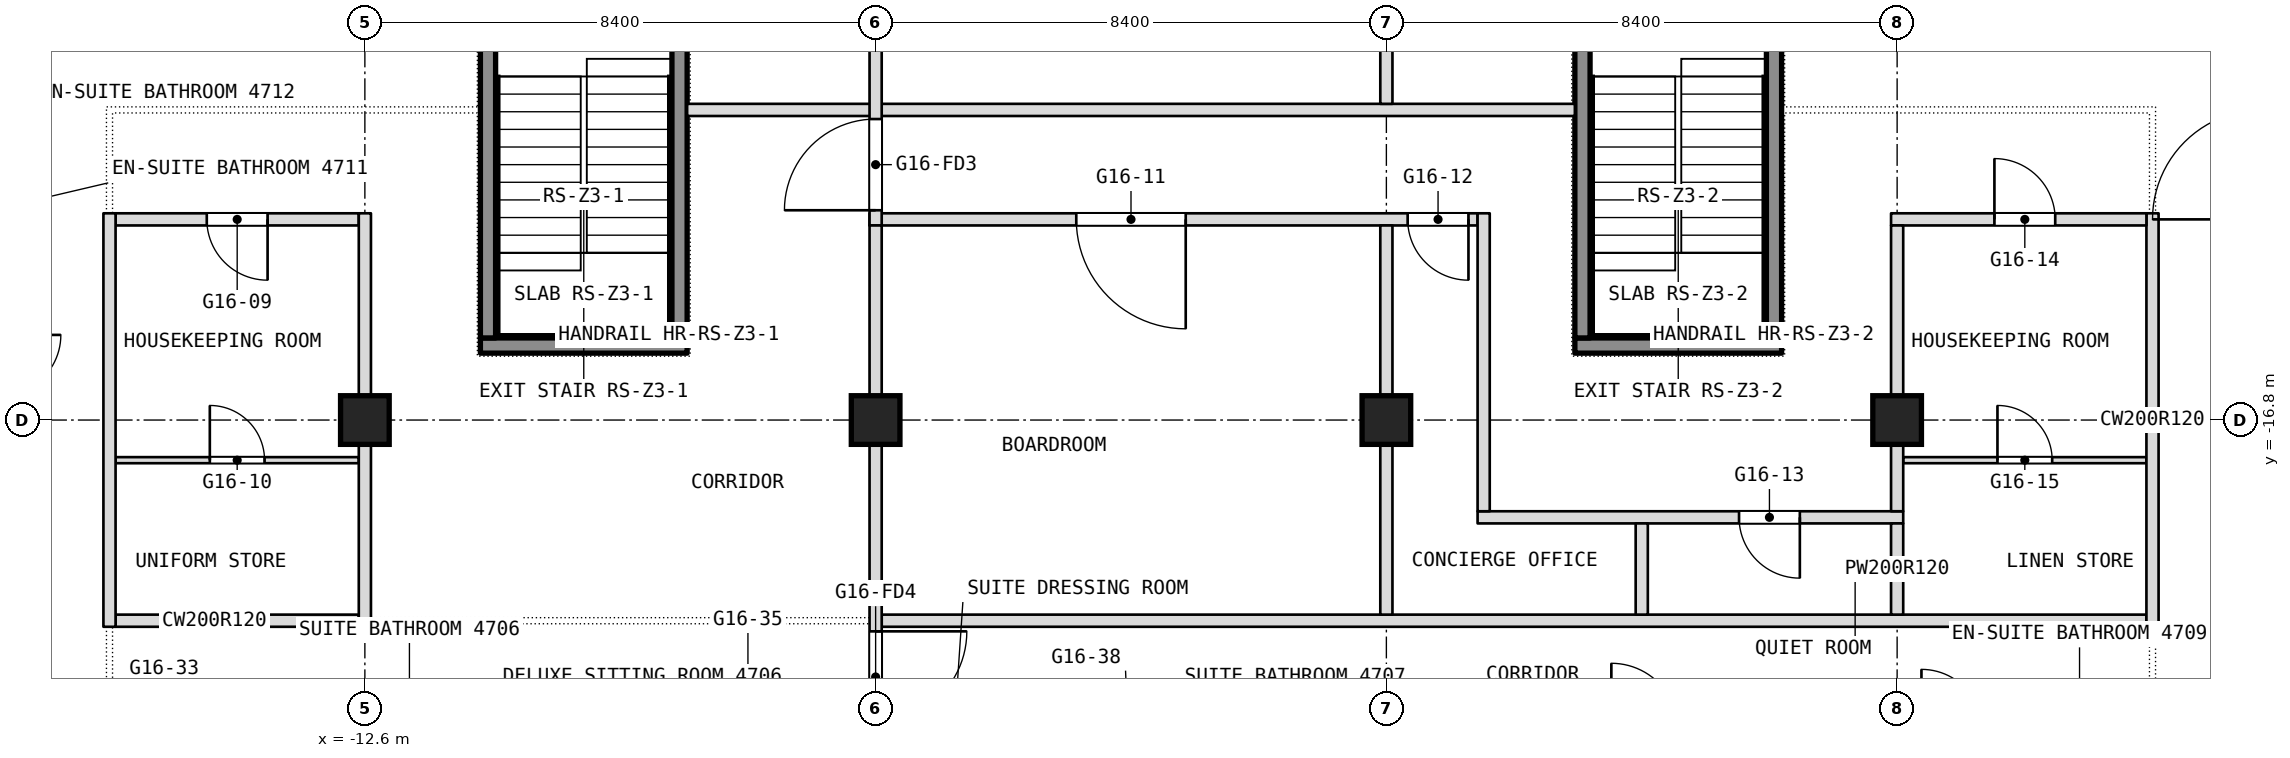
"""IFC4 building model, lengths in metres.
Left out: names, types, materials, properties, quantities, classifications, styles, units other than length and angle.
Written with IfcOpenShell. Run it as: python <this file> out.ifc"""

import sys

from ifc_helpers import new_model, si_unit, direction, frame, frame_2d, origin, origin_2d, place, context, subcontext, project, spatial, rectangle, extrude, element, fill, save


model = new_model("IFC4")
c1 = context("Model", 3, precision=1e-05, world=origin(), true_north=direction((0.0, 1.0)))
c2 = subcontext(c1, "Body", "Model", "MODEL_VIEW")
j1 = project(units=[si_unit("LENGTHUNIT", "METRE"), si_unit("PLANEANGLEUNIT", "RADIAN")], contexts=[c1])
p1 = place(None, origin())
s1 = spatial("IfcSite", under=j1, at=p1, CompositionType="ELEMENT")
p2 = place(p1, origin())
s2 = spatial("IfcBuilding", under=s1, at=p2, CompositionType="ELEMENT")
p3 = place(p2, frame((0.0, 0.0, 205.7)))
s3 = spatial("IfcBuildingStorey", under=s2, at=p3, CompositionType="ELEMENT", Elevation=205.7)
for number, where, z_axis, x_axis in (
    (1, (-12.6, -16.8, 0.0), (0.0, 0.0, 1.0), (1.0, 0.0, 0.0)),
    (2, (-4.2, -16.8, 0.0), (0.0, 0.0, 1.0), (1.0, 0.0, 0.0)),
    (3, (4.2, -16.8, 0.0), (0.0, 0.0, 1.0), (1.0, 0.0, 0.0)),
    (4, (12.6, -16.8, 0.0), (0.0, 0.0, 1.0), (1.0, 0.0, 0.0)),
):
    element("IfcColumn", number, at=place(p3, frame(where, z_axis=z_axis, x_axis=x_axis)), inside=s3, PredefinedType="COLUMN", context=c2, shape_type="SweptSolid", body=[
        extrude(rectangle(XDim=0.8, YDim=0.8, at=origin_2d()), origin(), (0.0, 0.0, 1.0), 3.6),
    ])
p4 = place(p3, frame((-16.7, -20.1, 0.0), z_axis=(0.0, 0.0, 1.0), x_axis=(1.0, 0.0, 0.0)))
e5 = element("IfcWall", 5, at=p4, inside=s3, PredefinedType="PARTITIONING", context=c2, shape_type="SweptSolid", body=[
    extrude(rectangle(XDim=4.0, YDim=0.2, at=frame_2d((2.0, 0.0))), origin(), (0.0, 0.0, 1.0), 3.34),
])
p5 = place(p3, frame((-4.1, -20.1, 0.0), z_axis=(0.0, 0.0, 1.0), x_axis=(1.0, 0.0, 0.0)))
e6 = element("IfcWall", 6, at=p5, inside=s3, PredefinedType="PARTITIONING", context=c2, shape_type="SweptSolid", body=[
    extrude(rectangle(XDim=20.8, YDim=0.2, at=frame_2d((10.4, 0.0))), origin(), (0.0, 0.0, 1.0), 3.34),
])
p6 = place(p3, frame((5.7, -18.4, 0.0), z_axis=(0.0, 0.0, 1.0), x_axis=(1.0, 0.0, 0.0)))
e7 = element("IfcWall", 7, at=p6, inside=s3, PredefinedType="PARTITIONING", context=c2, shape_type="SweptSolid", body=[
    extrude(rectangle(XDim=7.0, YDim=0.2, at=frame_2d((3.5, 0.0))), origin(), (0.0, 0.0, 1.0), 3.34),
])
p7 = place(p6, frame((4.3, 0.0, 0.0)))
e8 = element("IfcOpeningElement", 8, at=p7, cuts=e7, PredefinedType="OPENING", context=c2, shape_type="SweptSolid", body=[
    extrude(rectangle(XDim=1.0, YDim=2.1, at=frame_2d((0.5, 1.05))), frame((0.0, 0.1, 0.0), z_axis=(0.0, -1.0, 0.0), x_axis=(1.0, 0.0, 0.0)), (0.0, 0.0, 1.0), 0.2),
])
p8 = place(p3, frame((-16.7, -17.46, 0.0), z_axis=(0.0, 0.0, 1.0), x_axis=(1.0, 0.0, 0.0)))
e9 = element("IfcWall", 9, at=p8, inside=s3, PredefinedType="PARTITIONING", context=c2, shape_type="SweptSolid", body=[
    extrude(rectangle(XDim=4.0, YDim=0.1, at=frame_2d((2.0, 0.0))), origin(), (0.0, 0.0, 1.0), 3.34),
])
p9 = place(p8, frame((1.55, 0.0, 0.0)))
e10 = element("IfcOpeningElement", 10, at=p9, cuts=e9, PredefinedType="OPENING", context=c2, shape_type="SweptSolid", body=[
    extrude(rectangle(XDim=0.9, YDim=2.1, at=frame_2d((0.45, 1.05))), frame((0.0, 0.05, 0.0), z_axis=(0.0, -1.0, 0.0), x_axis=(1.0, 0.0, 0.0)), (0.0, 0.0, 1.0), 0.1),
])
p10 = place(p3, frame((12.7, -17.46, 0.0), z_axis=(0.0, 0.0, 1.0), x_axis=(1.0, 0.0, 0.0)))
e11 = element("IfcWall", 11, at=p10, inside=s3, PredefinedType="PARTITIONING", context=c2, shape_type="SweptSolid", body=[
    extrude(rectangle(XDim=4.0, YDim=0.1, at=frame_2d((2.0, 0.0))), origin(), (0.0, 0.0, 1.0), 3.34),
])
p11 = place(p10, frame((1.55, 0.0, 0.0)))
e12 = element("IfcOpeningElement", 12, at=p11, cuts=e11, PredefinedType="OPENING", context=c2, shape_type="SweptSolid", body=[
    extrude(rectangle(XDim=0.9, YDim=2.1, at=frame_2d((0.45, 1.05))), frame((0.0, 0.05, 0.0), z_axis=(0.0, -1.0, 0.0), x_axis=(1.0, 0.0, 0.0)), (0.0, 0.0, 1.0), 0.1),
])
p12 = place(p3, frame((16.8, -20.2, 0.0), z_axis=(0.0, 0.0, 1.0), x_axis=(0.0, 1.0, 0.0)))
e13 = element("IfcWall", 13, at=p12, inside=s3, PredefinedType="PARTITIONING", context=c2, shape_type="SweptSolid", body=[
    extrude(rectangle(XDim=6.8, YDim=0.2, at=frame_2d((3.4, 0.0))), origin(), (0.0, 0.0, 1.0), 3.34),
])
p13 = place(p3, frame((-16.7, -13.5, 0.0), z_axis=(0.0, 0.0, 1.0), x_axis=(1.0, 0.0, 0.0)))
e14 = element("IfcWall", 14, at=p13, inside=s3, PredefinedType="PARTITIONING", context=c2, shape_type="SweptSolid", body=[
    extrude(rectangle(XDim=4.0, YDim=0.2, at=frame_2d((2.0, 0.0))), origin(), (0.0, 0.0, 1.0), 3.34),
])
p14 = place(p13, frame((1.5, 0.0, 0.0)))
e15 = element("IfcOpeningElement", 15, at=p14, cuts=e14, PredefinedType="OPENING", context=c2, shape_type="SweptSolid", body=[
    extrude(rectangle(XDim=1.0, YDim=2.1, at=frame_2d((0.5, 1.05))), frame((0.0, 0.1, 0.0), z_axis=(0.0, -1.0, 0.0), x_axis=(1.0, 0.0, 0.0)), (0.0, 0.0, 1.0), 0.2),
])
p15 = place(p3, frame((-4.3, -13.5, 0.0), z_axis=(0.0, 0.0, 1.0), x_axis=(1.0, 0.0, 0.0)))
e16 = element("IfcWall", 16, at=p15, inside=s3, PredefinedType="PARTITIONING", context=c2, shape_type="SweptSolid", body=[
    extrude(rectangle(XDim=10.0, YDim=0.2, at=frame_2d((5.0, 0.0))), origin(), (0.0, 0.0, 1.0), 3.34),
])
p16 = place(p15, frame((3.4, 0.0, 0.0)))
e17 = element("IfcOpeningElement", 17, at=p16, cuts=e16, PredefinedType="OPENING", context=c2, shape_type="SweptSolid", body=[
    extrude(rectangle(XDim=1.8, YDim=2.1, at=frame_2d((0.9, 1.05))), frame((0.0, 0.1, 0.0), z_axis=(0.0, -1.0, 0.0), x_axis=(1.0, 0.0, 0.0)), (0.0, 0.0, 1.0), 0.2),
])
p17 = place(p15, frame((8.85, 0.0, 0.0)))
e18 = element("IfcOpeningElement", 18, at=p17, cuts=e16, PredefinedType="OPENING", context=c2, shape_type="SweptSolid", body=[
    extrude(rectangle(XDim=1.0, YDim=2.1, at=frame_2d((0.5, 1.05))), frame((0.0, 0.1, 0.0), z_axis=(0.0, -1.0, 0.0), x_axis=(1.0, 0.0, 0.0)), (0.0, 0.0, 1.0), 0.2),
])
p18 = place(p3, frame((12.5, -13.5, 0.0), z_axis=(0.0, 0.0, 1.0), x_axis=(1.0, 0.0, 0.0)))
e19 = element("IfcWall", 19, at=p18, inside=s3, PredefinedType="PARTITIONING", context=c2, shape_type="SweptSolid", body=[
    extrude(rectangle(XDim=4.2, YDim=0.2, at=frame_2d((2.1, 0.0))), origin(), (0.0, 0.0, 1.0), 3.34),
])
p19 = place(p18, frame((1.7, 0.0, 0.0)))
e20 = element("IfcOpeningElement", 20, at=p19, cuts=e19, PredefinedType="OPENING", context=c2, shape_type="SweptSolid", body=[
    extrude(rectangle(XDim=1.0, YDim=2.1, at=frame_2d((0.5, 1.05))), frame((0.0, 0.1, 0.0), z_axis=(0.0, -1.0, 0.0), x_axis=(1.0, 0.0, 0.0)), (0.0, 0.0, 1.0), 0.2),
])
p20 = place(p3, frame((12.6, -20.0, 0.0), z_axis=(0.0, 0.0, 1.0), x_axis=(0.0, 1.0, 0.0)))
e21 = element("IfcWall", 21, at=p20, inside=s3, PredefinedType="PARTITIONING", context=c2, shape_type="SweptSolid", body=[
    extrude(rectangle(XDim=1.5, YDim=0.2, at=frame_2d((0.75, 0.0))), origin(), (0.0, 0.0, 1.0), 3.34),
])
p21 = place(p3, frame((12.6, -18.3, 0.0), z_axis=(0.0, 0.0, 1.0), x_axis=(0.0, 1.0, 0.0)))
e22 = element("IfcWall", 22, at=p21, inside=s3, PredefinedType="PARTITIONING", context=c2, shape_type="SweptSolid", body=[
    extrude(rectangle(XDim=4.7, YDim=0.2, at=frame_2d((2.35, 0.0))), origin(), (0.0, 0.0, 1.0), 3.34),
])
p22 = place(p3, frame((-7.3, -11.7, 0.0), z_axis=(0.0, 0.0, 1.0), x_axis=(1.0, 0.0, 0.0)))
e23 = element("IfcWall", 23, at=p22, inside=s3, PredefinedType="PARTITIONING", context=c2, shape_type="SweptSolid", body=[
    extrude(rectangle(XDim=14.6, YDim=0.2, at=frame_2d((7.3, 0.0))), origin(), (0.0, 0.0, 1.0), 3.34),
])
p23 = place(p3, frame((8.4, -20.0, 0.0), z_axis=(0.0, 0.0, 1.0), x_axis=(0.0, 1.0, 0.0)))
e24 = element("IfcWall", 24, at=p23, inside=s3, PredefinedType="PARTITIONING", context=c2, shape_type="SweptSolid", body=[
    extrude(rectangle(XDim=1.5, YDim=0.2, at=frame_2d((0.75, 0.0))), origin(), (0.0, 0.0, 1.0), 3.34),
])
p24 = place(p3, frame((5.8, -18.3, 0.0), z_axis=(0.0, 0.0, 1.0), x_axis=(0.0, 1.0, 0.0)))
e25 = element("IfcWall", 25, at=p24, inside=s3, PredefinedType="PARTITIONING", context=c2, shape_type="SweptSolid", body=[
    extrude(rectangle(XDim=4.9, YDim=0.2, at=frame_2d((2.45, 0.0))), origin(), (0.0, 0.0, 1.0), 3.34),
])
p25 = place(p3, frame((4.2, -20.0, 0.0), z_axis=(0.0, 0.0, 1.0), x_axis=(0.0, 1.0, 0.0)))
e26 = element("IfcWall", 26, at=p25, inside=s3, PredefinedType="PARTITIONING", context=c2, shape_type="SweptSolid", body=[
    extrude(rectangle(XDim=6.4, YDim=0.2, at=frame_2d((3.2, 0.0))), origin(), (0.0, 0.0, 1.0), 3.34),
])
p26 = place(p3, frame((4.2, -11.6, 0.0), z_axis=(0.0, 0.0, 1.0), x_axis=(0.0, 1.0, 0.0)))
e27 = element("IfcWall", 27, at=p26, inside=s3, PredefinedType="PARTITIONING", context=c2, shape_type="SweptSolid", body=[
    extrude(rectangle(XDim=9.7, YDim=0.2, at=frame_2d((4.85, 0.0))), origin(), (0.0, 0.0, 1.0), 3.34),
])
p27 = place(p3, frame((-4.2, -13.6, 0.0), z_axis=(0.0, 0.0, 1.0), x_axis=(0.0, 1.0, 0.0)))
e28 = element("IfcWall", 28, at=p27, inside=s3, PredefinedType="PARTITIONING", context=c2, shape_type="SweptSolid", body=[
    extrude(rectangle(XDim=13.6, YDim=0.2, at=frame_2d((6.8, 0.0))), origin(), (0.0, 0.0, 1.0), 3.34),
])
p28 = place(p27, frame((11.95, 0.0, 0.0)))
e29 = element("IfcOpeningElement", 29, at=p28, cuts=e28, PredefinedType="OPENING", context=c2, shape_type="SweptSolid", body=[
    extrude(rectangle(XDim=1.5, YDim=2.1, at=frame_2d((0.75, 1.05))), frame((0.0, 0.1, 0.0), z_axis=(0.0, -1.0, 0.0), x_axis=(1.0, 0.0, 0.0)), (0.0, 0.0, 1.0), 0.2),
])
p29 = place(p27, frame((0.25, 0.0, 0.0)))
e30 = element("IfcOpeningElement", 30, at=p29, cuts=e28, PredefinedType="OPENING", context=c2, shape_type="SweptSolid", body=[
    extrude(rectangle(XDim=1.5, YDim=2.1, at=frame_2d((0.75, 1.05))), frame((0.0, 0.1, 0.0), z_axis=(0.0, -1.0, 0.0), x_axis=(1.0, 0.0, 0.0)), (0.0, 0.0, 1.0), 0.2),
])
p30 = place(p3, frame((-4.2, -22.0, 0.0), z_axis=(0.0, 0.0, 1.0), x_axis=(0.0, 1.0, 0.0)))
e31 = element("IfcWall", 31, at=p30, inside=s3, PredefinedType="PARTITIONING", context=c2, shape_type="SweptSolid", body=[
    extrude(rectangle(XDim=8.4, YDim=0.2, at=frame_2d((4.2, 0.0))), origin(), (0.0, 0.0, 1.0), 3.34),
])
p31 = place(p30, frame((0.225, 0.0, 0.0)))
e32 = element("IfcOpeningElement", 32, at=p31, cuts=e31, PredefinedType="OPENING", context=c2, shape_type="SweptSolid", body=[
    extrude(rectangle(XDim=1.5, YDim=2.1, at=frame_2d((0.75, 1.05))), frame((0.0, 0.1, 0.0), z_axis=(0.0, -1.0, 0.0), x_axis=(1.0, 0.0, 0.0)), (0.0, 0.0, 1.0), 0.2),
])
for number, where, z_axis, x_axis in (
    (33, (-12.6, -20.2, 0.0), (0.0, 0.0, 1.0), (0.0, 1.0, 0.0)),
    (34, (-16.8, -20.2, 0.0), (0.0, 0.0, 1.0), (0.0, 1.0, 0.0)),
):
    element("IfcWall", number, at=place(p3, frame(where, z_axis=z_axis, x_axis=x_axis)), inside=s3, PredefinedType="PARTITIONING", context=c2, shape_type="SweptSolid", body=[
        extrude(rectangle(XDim=6.8, YDim=0.2, at=frame_2d((3.4, 0.0))), origin(), (0.0, 0.0, 1.0), 3.34),
    ])
p32 = place(p3, frame((-10.7, -15.575, 0.1), z_axis=(0.0, 0.0, 1.0), x_axis=(1.0, 0.0, 0.0)))
e35 = element("IfcWall", 35, at=p32, inside=s3, PredefinedType="SHEAR", context=c2, shape_type="SweptSolid", body=[
    extrude(rectangle(XDim=3.4, YDim=0.25, at=frame_2d((1.7, 0.0))), origin(), (0.0, 0.0, 1.0), 3.6),
])
for number, where, z_axis, x_axis in (
    (36, (-10.575, -15.45, 0.1), (0.0, 0.0, 1.0), (0.0, 1.0, 0.0)),
    (37, (-7.425, -15.45, 0.1), (0.0, 0.0, 1.0), (0.0, 1.0, 0.0)),
):
    element("IfcWall", number, at=place(p3, frame(where, z_axis=z_axis, x_axis=x_axis)), inside=s3, PredefinedType="SHEAR", context=c2, shape_type="SweptSolid", body=[
        extrude(rectangle(XDim=5.7, YDim=0.25, at=frame_2d((2.85, 0.0))), origin(), (0.0, 0.0, 1.0), 3.6),
    ])
p33 = place(p3, frame((7.3, -15.575, 0.1), z_axis=(0.0, 0.0, 1.0), x_axis=(1.0, 0.0, 0.0)))
e38 = element("IfcWall", 38, at=p33, inside=s3, PredefinedType="SHEAR", context=c2, shape_type="SweptSolid", body=[
    extrude(rectangle(XDim=3.4, YDim=0.25, at=frame_2d((1.7, 0.0))), origin(), (0.0, 0.0, 1.0), 3.6),
])
for number, where, z_axis, x_axis in (
    (39, (7.425, -15.45, 0.1), (0.0, 0.0, 1.0), (0.0, 1.0, 0.0)),
    (40, (10.575, -15.45, 0.1), (0.0, 0.0, 1.0), (0.0, 1.0, 0.0)),
):
    element("IfcWall", number, at=place(p3, frame(where, z_axis=z_axis, x_axis=x_axis)), inside=s3, PredefinedType="SHEAR", context=c2, shape_type="SweptSolid", body=[
        extrude(rectangle(XDim=5.7, YDim=0.25, at=frame_2d((2.85, 0.0))), origin(), (0.0, 0.0, 1.0), 3.6),
    ])
p34 = place(p7, origin())
e41 = element("IfcDoor", 41, at=p34, inside=s3, OperationType="SINGLE_SWING_RIGHT", PredefinedType="DOOR", context=c2, shape_type="SweptSolid", body=[
    extrude(rectangle(XDim=1.0, YDim=2.1, at=frame_2d((0.5, 1.05))), frame((0.0, 0.025, 0.0), z_axis=(0.0, -1.0, 0.0), x_axis=(1.0, 0.0, 0.0)), (0.0, 0.0, 1.0), 0.05),
])
fill(e8, e41)
p35 = place(p9, origin())
e42 = element("IfcDoor", 42, at=p35, inside=s3, OperationType="SINGLE_SWING_LEFT", PredefinedType="DOOR", context=c2, shape_type="SweptSolid", body=[
    extrude(rectangle(XDim=0.9, YDim=2.1, at=frame_2d((0.45, 1.05))), frame((0.0, 0.025, 0.0), z_axis=(0.0, -1.0, 0.0), x_axis=(1.0, 0.0, 0.0)), (0.0, 0.0, 1.0), 0.05),
])
fill(e10, e42)
p36 = place(p11, origin())
e43 = element("IfcDoor", 43, at=p36, inside=s3, OperationType="SINGLE_SWING_RIGHT", PredefinedType="DOOR", context=c2, shape_type="SweptSolid", body=[
    extrude(rectangle(XDim=0.9, YDim=2.1, at=frame_2d((0.45, 1.05))), frame((0.0, 0.025, 0.0), z_axis=(0.0, -1.0, 0.0), x_axis=(1.0, 0.0, 0.0)), (0.0, 0.0, 1.0), 0.05),
])
fill(e12, e43)
p37 = place(p14, origin())
e44 = element("IfcDoor", 44, at=p37, inside=s3, OperationType="SINGLE_SWING_LEFT", PredefinedType="DOOR", context=c2, shape_type="SweptSolid", body=[
    extrude(rectangle(XDim=1.0, YDim=2.1, at=frame_2d((0.5, 1.05))), frame((0.0, 0.025, 0.0), z_axis=(0.0, -1.0, 0.0), x_axis=(1.0, 0.0, 0.0)), (0.0, 0.0, 1.0), 0.05),
])
fill(e15, e44)
p38 = place(p16, origin())
e45 = element("IfcDoor", 45, at=p38, inside=s3, OperationType="DOUBLE_DOOR_SINGLE_SWING", PredefinedType="DOOR", context=c2, shape_type="SweptSolid", body=[
    extrude(rectangle(XDim=1.8, YDim=2.1, at=frame_2d((0.9, 1.05))), frame((0.0, 0.025, 0.0), z_axis=(0.0, -1.0, 0.0), x_axis=(1.0, 0.0, 0.0)), (0.0, 0.0, 1.0), 0.05),
])
fill(e17, e45)
p39 = place(p17, origin())
e46 = element("IfcDoor", 46, at=p39, inside=s3, OperationType="SINGLE_SWING_LEFT", PredefinedType="DOOR", context=c2, shape_type="SweptSolid", body=[
    extrude(rectangle(XDim=1.0, YDim=2.1, at=frame_2d((0.5, 1.05))), frame((0.0, 0.025, 0.0), z_axis=(0.0, -1.0, 0.0), x_axis=(1.0, 0.0, 0.0)), (0.0, 0.0, 1.0), 0.05),
])
fill(e18, e46)
p40 = place(p19, origin())
e47 = element("IfcDoor", 47, at=p40, inside=s3, OperationType="SINGLE_SWING_RIGHT", PredefinedType="DOOR", context=c2, shape_type="SweptSolid", body=[
    extrude(rectangle(XDim=1.0, YDim=2.1, at=frame_2d((0.5, 1.05))), frame((0.0, 0.025, 0.0), z_axis=(0.0, -1.0, 0.0), x_axis=(1.0, 0.0, 0.0)), (0.0, 0.0, 1.0), 0.05),
])
fill(e20, e47)
p41 = place(p29, origin())
e48 = element("IfcDoor", 48, at=p41, inside=s3, OperationType="DOUBLE_DOOR_DOUBLE_SWING", PredefinedType="DOOR", context=c2, shape_type="SweptSolid", body=[
    extrude(rectangle(XDim=1.5, YDim=2.1, at=frame_2d((0.75, 1.05))), frame((0.0, 0.025, 0.0), z_axis=(0.0, -1.0, 0.0), x_axis=(1.0, 0.0, 0.0)), (0.0, 0.0, 1.0), 0.05),
])
fill(e30, e48)
p42 = place(p31, origin())
e49 = element("IfcDoor", 49, at=p42, inside=s3, OperationType="DOUBLE_DOOR_DOUBLE_SWING", PredefinedType="DOOR", context=c2, shape_type="SweptSolid", body=[
    extrude(rectangle(XDim=1.5, YDim=2.1, at=frame_2d((0.75, 1.05))), frame((0.0, 0.025, 0.0), z_axis=(0.0, -1.0, 0.0), x_axis=(1.0, 0.0, 0.0)), (0.0, 0.0, 1.0), 0.05),
])
fill(e32, e49)
save(model, sys.argv[1])
